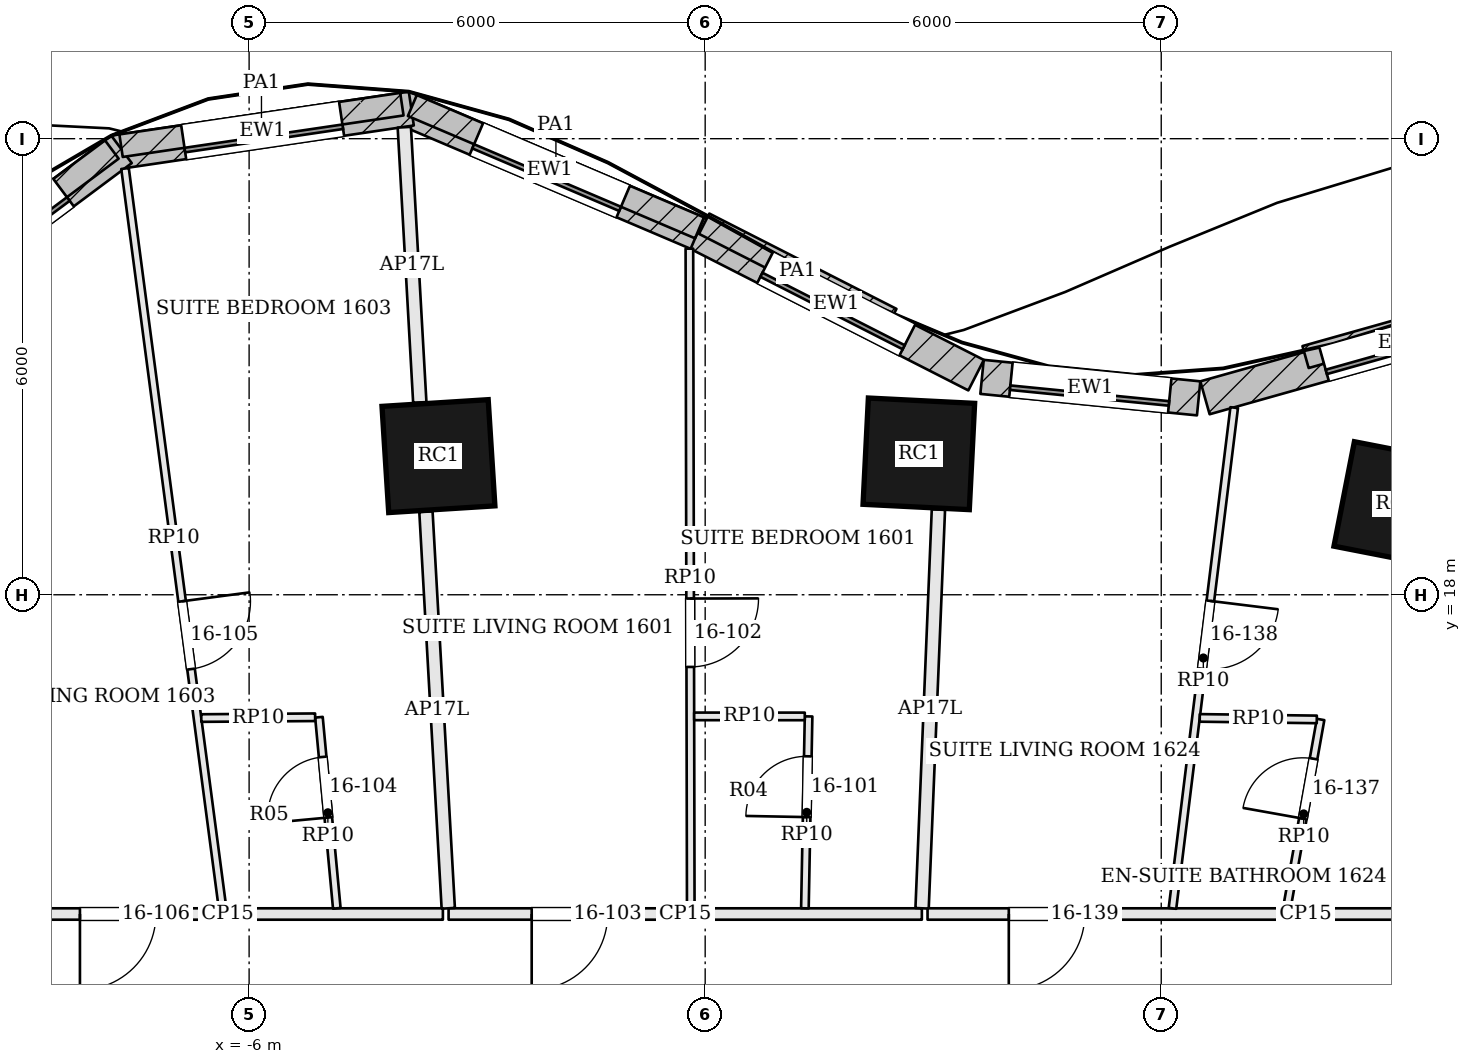
"""IFC4 building model, lengths in metres.
Left out: names, types, materials, properties, quantities, classifications, styles, units other than length and angle.
Written with IfcOpenShell. Run it as: python <this file> out.ifc"""

import sys

from ifc_helpers import new_model, si_unit, direction, frame, frame_2d, origin, origin_2d, place, context, subcontext, project, spatial, rectangle, extrude, element, fill, save


model = new_model("IFC4")
c1 = context("Model", 3, precision=1e-05, world=origin(), true_north=direction((0.0, 1.0)))
c2 = subcontext(c1, "Body", "Model", "MODEL_VIEW")
j1 = project(units=[si_unit("LENGTHUNIT", "METRE"), si_unit("PLANEANGLEUNIT", "RADIAN")], contexts=[c1])
p1 = place(None, origin())
s1 = spatial("IfcSite", under=j1, at=p1, CompositionType="ELEMENT")
p2 = place(p1, origin())
s2 = spatial("IfcBuilding", under=s1, at=p2, CompositionType="ELEMENT")
p3 = place(p2, frame((0.0, 0.0, 73.5)))
s3 = spatial("IfcBuildingStorey", under=s2, at=p3, CompositionType="ELEMENT", Elevation=73.5)
for number, where, z_axis, x_axis in (
    (1, (9.094, 19.192, 0.0), (0.0, 0.0, 1.0), (-0.981, 0.192, 0.0)),
    (2, (2.811, 19.854, 0.0), (0.0, 0.0, 1.0), (-0.999, 0.05, 0.0)),
    (3, (-3.509, 19.824, 0.0), (0.0, 0.0, 1.0), (-0.998, -0.063, 0.0)),
):
    element("IfcColumn", number, at=place(p3, frame(where, z_axis=z_axis, x_axis=x_axis)), inside=s3, PredefinedType="COLUMN", context=c2, shape_type="SweptSolid", body=[
        extrude(rectangle(XDim=1.4, YDim=1.4, at=origin_2d()), origin(), (0.0, 0.0, 1.0), 2.8),
    ])
p4 = place(p3, frame((11.732, 22.044, 0.0), z_axis=(0.0, 0.0, 1.0), x_axis=(-0.962535416232, -0.271155992925, 0.0)))
e4 = element("IfcWall", 4, at=p4, inside=s3, PredefinedType="SOLIDWALL", context=c2, shape_type="SweptSolid", body=[
    extrude(rectangle(XDim=5.357, YDim=0.45, at=frame_2d((2.679, 0.0))), origin(), (0.0, 0.0, 1.0), 3.3),
])
p5 = place(p4, frame((1.629, 0.0, 0.9)))
e5 = element("IfcOpeningElement", 5, at=p5, cuts=e4, PredefinedType="OPENING", context=c2, shape_type="SweptSolid", body=[
    extrude(rectangle(XDim=2.1, YDim=1.8, at=frame_2d((1.05, 0.9))), frame((0.0, 0.235, 0.0), z_axis=(0.0, -1.0, 0.0), x_axis=(1.0, 0.0, 0.0)), (0.0, 0.0, 1.0), 0.47),
])
p6 = place(p3, frame((6.492, 20.584, 0.0), z_axis=(0.0, 0.0, 1.0), x_axis=(-0.995123748575, 0.098634299418, 0.0)))
e6 = element("IfcWall", 6, at=p6, inside=s3, PredefinedType="SOLIDWALL", context=c2, shape_type="SweptSolid", body=[
    extrude(rectangle(XDim=2.864, YDim=0.45, at=frame_2d((1.432, 0.0))), origin(), (0.0, 0.0, 1.0), 3.3),
])
p7 = place(p6, frame((0.382, 0.0, 0.9)))
e7 = element("IfcOpeningElement", 7, at=p7, cuts=e6, PredefinedType="OPENING", context=c2, shape_type="SweptSolid", body=[
    extrude(rectangle(XDim=2.1, YDim=1.8, at=frame_2d((1.05, 0.9))), frame((0.0, 0.235, 0.0), z_axis=(0.0, -1.0, 0.0), x_axis=(1.0, 0.0, 0.0)), (0.0, 0.0, 1.0), 0.47),
])
p8 = place(p3, frame((3.564, 20.889, 0.0), z_axis=(0.0, 0.0, 1.0), x_axis=(-0.891033634447, 0.453937288933, 0.0)))
e8 = element("IfcWall", 8, at=p8, inside=s3, PredefinedType="SOLIDWALL", context=c2, shape_type="SweptSolid", body=[
    extrude(rectangle(XDim=4.132, YDim=0.45, at=frame_2d((2.066, 0.0))), origin(), (0.0, 0.0, 1.0), 3.3),
])
p9 = place(p8, frame((1.016, 0.0, 0.9)))
e9 = element("IfcOpeningElement", 9, at=p9, cuts=e8, PredefinedType="OPENING", context=c2, shape_type="SweptSolid", body=[
    extrude(rectangle(XDim=2.1, YDim=1.8, at=frame_2d((1.05, 0.9))), frame((0.0, 0.235, 0.0), z_axis=(0.0, -1.0, 0.0), x_axis=(1.0, 0.0, 0.0)), (0.0, 0.0, 1.0), 0.47),
])
p10 = place(p3, frame((-0.103, 22.758, 0.0), z_axis=(0.0, 0.0, 1.0), x_axis=(-0.920037498786, 0.391830321475, 0.0)))
e10 = element("IfcWall", 10, at=p10, inside=s3, PredefinedType="SOLIDWALL", context=c2, shape_type="SweptSolid", body=[
    extrude(rectangle(XDim=4.219, YDim=0.45, at=frame_2d((2.11, 0.0))), origin(), (0.0, 0.0, 1.0), 3.3),
])
p11 = place(p10, frame((1.06, 0.0, 0.9)))
e11 = element("IfcOpeningElement", 11, at=p11, cuts=e10, PredefinedType="OPENING", context=c2, shape_type="SweptSolid", body=[
    extrude(rectangle(XDim=2.1, YDim=1.8, at=frame_2d((1.05, 0.9))), frame((0.0, 0.235, 0.0), z_axis=(0.0, -1.0, 0.0), x_axis=(1.0, 0.0, 0.0)), (0.0, 0.0, 1.0), 0.47),
])
p12 = place(p3, frame((-3.866, 24.396, 0.0), z_axis=(0.0, 0.0, 1.0), x_axis=(-0.989255112942, -0.146199594798, 0.0)))
e12 = element("IfcWall", 12, at=p12, inside=s3, PredefinedType="SOLIDWALL", context=c2, shape_type="SweptSolid", body=[
    extrude(rectangle(XDim=3.954, YDim=0.45, at=frame_2d((1.977, 0.0))), origin(), (0.0, 0.0, 1.0), 3.3),
])
p13 = place(p12, frame((0.927, 0.0, 0.9)))
e13 = element("IfcOpeningElement", 13, at=p13, cuts=e12, PredefinedType="OPENING", context=c2, shape_type="SweptSolid", body=[
    extrude(rectangle(XDim=2.1, YDim=1.8, at=frame_2d((1.05, 0.9))), frame((0.0, 0.235, 0.0), z_axis=(0.0, -1.0, 0.0), x_axis=(1.0, 0.0, 0.0)), (0.0, 0.0, 1.0), 0.47),
])
p14 = place(p3, frame((-7.678, 23.859, 0.0), z_axis=(0.0, 0.0, 1.0), x_axis=(-0.801665619573, -0.597772728046, 0.0)))
e14 = element("IfcWall", 14, at=p14, inside=s3, PredefinedType="SOLIDWALL", context=c2, shape_type="SweptSolid", body=[
    extrude(rectangle(XDim=4.003, YDim=0.45, at=frame_2d((2.001, 0.0))), origin(), (0.0, 0.0, 1.0), 3.3),
])
p15 = place(p14, frame((0.951, 0.0, 0.9)))
e15 = element("IfcOpeningElement", 15, at=p15, cuts=e14, PredefinedType="OPENING", context=c2, shape_type="SweptSolid", body=[
    extrude(rectangle(XDim=2.1, YDim=1.8, at=frame_2d((1.05, 0.9))), frame((0.0, 0.235, 0.0), z_axis=(0.0, -1.0, 0.0), x_axis=(1.0, 0.0, 0.0)), (0.0, 0.0, 1.0), 0.47),
])
p16 = place(p3, frame((11.314, 22.089, 3.6), z_axis=(0.0, 0.0, 1.0), x_axis=(-0.962527541074, -0.271183946195, 0.0)))
e16 = element("IfcWall", 16, at=p16, inside=s3, PredefinedType="PARAPET", context=c2, shape_type="SweptSolid", body=[
    extrude(rectangle(XDim=3.548, YDim=0.3, at=frame_2d((1.774, 0.0))), origin(), (0.0, 0.0, 1.0), 1.1),
])
p17 = place(p3, frame((2.448, 21.627, 3.6), z_axis=(0.0, 0.0, 1.0), x_axis=(-0.891061751317, 0.453882094095, 0.0)))
e17 = element("IfcWall", 17, at=p17, inside=s3, PredefinedType="PARAPET", context=c2, shape_type="SweptSolid", body=[
    extrude(rectangle(XDim=2.763, YDim=0.3, at=frame_2d((1.381, 0.0))), origin(), (0.0, 0.0, 1.0), 1.1),
])
p18 = place(p3, frame((-0.075, 22.827, 3.6), z_axis=(0.0, 0.0, 1.0), x_axis=(-0.920031521407, 0.391844356367, 0.0)))
e18 = element("IfcWall", 18, at=p18, inside=s3, PredefinedType="PARAPET", context=c2, shape_type="SweptSolid", body=[
    extrude(rectangle(XDim=4.106, YDim=0.3, at=frame_2d((2.053, 0.0))), origin(), (0.0, 0.0, 1.0), 1.1),
])
p19 = place(p3, frame((-3.99, 24.454, 3.6), z_axis=(0.0, 0.0, 1.0), x_axis=(-0.989258150551, -0.146179039429, 0.0)))
e19 = element("IfcWall", 19, at=p19, inside=s3, PredefinedType="PARAPET", context=c2, shape_type="SweptSolid", body=[
    extrude(rectangle(XDim=3.734, YDim=0.3, at=frame_2d((1.867, 0.0))), origin(), (0.0, 0.0, 1.0), 1.1),
])
p20 = place(p3, frame((-7.806, 23.858, 3.6), z_axis=(0.0, 0.0, 1.0), x_axis=(-0.801649538596, -0.597794293439, 0.0)))
e20 = element("IfcWall", 20, at=p20, inside=s3, PredefinedType="PARAPET", context=c2, shape_type="SweptSolid", body=[
    extrude(rectangle(XDim=3.865, YDim=0.3, at=frame_2d((1.932, 0.0))), origin(), (0.0, 0.0, 1.0), 1.1),
])
p21 = place(p3, frame((2.851, 13.8, 0.0), z_axis=(0.0, 0.0, 1.0), x_axis=(-1.0, 0.0, 0.0)))
e21 = element("IfcWall", 21, at=p21, inside=s3, PredefinedType="PARTITIONING", context=c2, shape_type="SweptSolid", body=[
    extrude(rectangle(XDim=6.226, YDim=0.15, at=frame_2d((3.113, 0.0))), origin(), (0.0, 0.0, 1.0), 2.684),
])
p22 = place(p21, frame((4.133, 0.0, 0.0)))
e22 = element("IfcOpeningElement", 22, at=p22, cuts=e21, PredefinedType="OPENING", context=c2, shape_type="SweptSolid", body=[
    extrude(rectangle(XDim=1.0, YDim=2.1, at=frame_2d((0.5, 1.05))), frame((0.0, 0.085, 0.0), z_axis=(0.0, -1.0, 0.0), x_axis=(1.0, 0.0, 0.0)), (0.0, 0.0, 1.0), 0.17),
])
p23 = place(p3, frame((3.069, 19.12, 0.0), z_axis=(0.0, 0.0, 1.0), x_axis=(-0.040926396591, -0.999162164046, 0.0)))
e23 = element("IfcWall", 23, at=p23, inside=s3, PredefinedType="PARTITIONING", context=c2, shape_type="SweptSolid", body=[
    extrude(rectangle(XDim=5.25, YDim=0.175, at=frame_2d((2.625, 0.0))), origin(), (0.0, 0.0, 1.0), 2.28),
])
p24 = place(p3, frame((-3.958, 24.151, 0.0), z_axis=(0.0, 0.0, 1.0), x_axis=(0.056208193319, -0.998419069832, 0.0)))
e24 = element("IfcWall", 24, at=p24, inside=s3, PredefinedType="PARTITIONING", context=c2, shape_type="SweptSolid", body=[
    extrude(rectangle(XDim=3.627, YDim=0.175, at=frame_2d((1.813, 0.0))), origin(), (0.0, 0.0, 1.0), 2.28),
])
p25 = place(p3, frame((-3.674, 19.092, 0.0), z_axis=(0.0, 0.0, 1.0), x_axis=(0.056204883722, -0.998419256147, 0.0)))
e25 = element("IfcWall", 25, at=p25, inside=s3, PredefinedType="PARTITIONING", context=c2, shape_type="SweptSolid", body=[
    extrude(rectangle(XDim=5.226, YDim=0.175, at=frame_2d((2.613, 0.0))), origin(), (0.0, 0.0, 1.0), 2.28),
])
p26 = place(p3, frame((-3.451, 13.8, 0.0), z_axis=(0.0, 0.0, 1.0), x_axis=(-1.0, 0.0, 0.0)))
e26 = element("IfcWall", 26, at=p26, inside=s3, PredefinedType="PARTITIONING", context=c2, shape_type="SweptSolid", body=[
    extrude(rectangle(XDim=5.661, YDim=0.15, at=frame_2d((2.831, 0.0))), origin(), (0.0, 0.0, 1.0), 2.684),
])
p27 = place(p26, frame((3.775, 0.0, 0.0)))
e27 = element("IfcOpeningElement", 27, at=p27, cuts=e26, PredefinedType="OPENING", context=c2, shape_type="SweptSolid", body=[
    extrude(rectangle(XDim=1.0, YDim=2.1, at=frame_2d((0.5, 1.05))), frame((0.0, 0.085, 0.0), z_axis=(0.0, -1.0, 0.0), x_axis=(1.0, 0.0, 0.0)), (0.0, 0.0, 1.0), 0.17),
])
p28 = place(p3, frame((12.872, 13.8, 0.0), z_axis=(0.0, 0.0, 1.0), x_axis=(-1.0, 0.0, 0.0)))
e28 = element("IfcWall", 28, at=p28, inside=s3, PredefinedType="PARTITIONING", context=c2, shape_type="SweptSolid", body=[
    extrude(rectangle(XDim=9.946, YDim=0.15, at=frame_2d((4.973, 0.0))), origin(), (0.0, 0.0, 1.0), 2.684),
])
p29 = place(p28, frame((7.877, 0.0, 0.0)))
e29 = element("IfcOpeningElement", 29, at=p29, cuts=e28, PredefinedType="OPENING", context=c2, shape_type="SweptSolid", body=[
    extrude(rectangle(XDim=1.0, YDim=2.1, at=frame_2d((0.5, 1.05))), frame((0.0, 0.085, 0.0), z_axis=(0.0, -1.0, 0.0), x_axis=(1.0, 0.0, 0.0)), (0.0, 0.0, 1.0), 0.17),
])
p30 = place(p3, frame((-0.208, 22.553, 0.0), z_axis=(0.0, 0.0, 1.0), x_axis=(0.002053672595, -0.999997891212, 0.0)))
e30 = element("IfcWall", 30, at=p30, inside=s3, PredefinedType="PARTITIONING", context=c2, shape_type="SweptSolid", body=[
    extrude(rectangle(XDim=8.678, YDim=0.1, at=frame_2d((4.339, 0.0))), origin(), (0.0, 0.0, 1.0), 2.784),
])
p31 = place(p30, frame((4.603, 0.0, 0.0)))
e31 = element("IfcOpeningElement", 31, at=p31, cuts=e30, PredefinedType="OPENING", context=c2, shape_type="SweptSolid", body=[
    extrude(rectangle(XDim=0.9, YDim=2.4, at=frame_2d((0.45, 1.2))), frame((0.0, 0.06, 0.0), z_axis=(0.0, -1.0, 0.0), x_axis=(1.0, 0.0, 0.0)), (0.0, 0.0, 1.0), 0.12),
])
p32 = place(p3, frame((1.312, 13.875, 0.0), z_axis=(0.0, 0.0, 1.0), x_axis=(0.019145426353, 0.999816709527, 0.0)))
e32 = element("IfcWall", 32, at=p32, inside=s3, PredefinedType="PARTITIONING", context=c2, shape_type="SweptSolid", body=[
    extrude(rectangle(XDim=2.525, YDim=0.1, at=frame_2d((1.262, 0.0))), origin(), (0.0, 0.0, 1.0), 2.784),
])
p33 = place(p32, frame((1.2, 0.0, 0.0)))
e33 = element("IfcOpeningElement", 33, at=p33, cuts=e32, PredefinedType="OPENING", context=c2, shape_type="SweptSolid", body=[
    extrude(rectangle(XDim=0.8, YDim=2.1, at=frame_2d((0.4, 1.05))), frame((0.0, 0.06, 0.0), z_axis=(0.0, -1.0, 0.0), x_axis=(1.0, 0.0, 0.0)), (0.0, 0.0, 1.0), 0.12),
])
p34 = place(p3, frame((1.31, 16.399, 0.0), z_axis=(0.0, 0.0, 1.0), x_axis=(-0.999999943696, 0.000335570451, 0.0)))
e34 = element("IfcWall", 34, at=p34, inside=s3, PredefinedType="PARTITIONING", context=c2, shape_type="SweptSolid", body=[
    extrude(rectangle(XDim=1.455, YDim=0.1, at=frame_2d((0.728, 0.0))), origin(), (0.0, 0.0, 1.0), 2.784),
])
p35 = place(p3, frame((-7.633, 23.608, 0.0), z_axis=(0.0, 0.0, 1.0), x_axis=(0.130728541202, -0.991418200617, 0.0)))
e35 = element("IfcWall", 35, at=p35, inside=s3, PredefinedType="PARTITIONING", context=c2, shape_type="SweptSolid", body=[
    extrude(rectangle(XDim=9.818, YDim=0.1, at=frame_2d((4.909, 0.0))), origin(), (0.0, 0.0, 1.0), 2.784),
])
p36 = place(p35, frame((5.743, 0.0, 0.0)))
e36 = element("IfcOpeningElement", 36, at=p36, cuts=e35, PredefinedType="OPENING", context=c2, shape_type="SweptSolid", body=[
    extrude(rectangle(XDim=0.9, YDim=2.4, at=frame_2d((0.45, 1.2))), frame((0.0, 0.06, 0.0), z_axis=(0.0, -1.0, 0.0), x_axis=(1.0, 0.0, 0.0)), (0.0, 0.0, 1.0), 0.12),
])
p37 = place(p3, frame((-4.846, 13.875, 0.0), z_axis=(0.0, 0.0, 1.0), x_axis=(-0.093020198256, 0.995664221872, 0.0)))
e37 = element("IfcWall", 37, at=p37, inside=s3, PredefinedType="PARTITIONING", context=c2, shape_type="SweptSolid", body=[
    extrude(rectangle(XDim=2.525, YDim=0.1, at=frame_2d((1.262, 0.0))), origin(), (0.0, 0.0, 1.0), 2.784),
])
p38 = place(p37, frame((1.2, 0.0, 0.0)))
e38 = element("IfcOpeningElement", 38, at=p38, cuts=e37, PredefinedType="OPENING", context=c2, shape_type="SweptSolid", body=[
    extrude(rectangle(XDim=0.8, YDim=2.1, at=frame_2d((0.4, 1.05))), frame((0.0, 0.06, 0.0), z_axis=(0.0, -1.0, 0.0), x_axis=(1.0, 0.0, 0.0)), (0.0, 0.0, 1.0), 0.12),
])
p39 = place(p3, frame((-5.131, 16.388, 0.0), z_axis=(0.0, 0.0, 1.0), x_axis=(-0.99997543811, -0.007008792802, 0.0)))
e39 = element("IfcWall", 39, at=p39, inside=s3, PredefinedType="PARTITIONING", context=c2, shape_type="SweptSolid", body=[
    extrude(rectangle(XDim=1.498, YDim=0.1, at=frame_2d((0.749, 0.0))), origin(), (0.0, 0.0, 1.0), 2.784),
])
p40 = place(p3, frame((6.96, 20.462, 0.0), z_axis=(0.0, 0.0, 1.0), x_axis=(-0.12234585507, -0.99248752725, 0.0)))
e40 = element("IfcWall", 40, at=p40, inside=s3, PredefinedType="PARTITIONING", context=c2, shape_type="SweptSolid", body=[
    extrude(rectangle(XDim=6.637, YDim=0.1, at=frame_2d((3.318, 0.0))), origin(), (0.0, 0.0, 1.0), 2.784),
])
p41 = place(p40, frame((2.562, 0.0, 0.0)))
e41 = element("IfcOpeningElement", 41, at=p41, cuts=e40, PredefinedType="OPENING", context=c2, shape_type="SweptSolid", body=[
    extrude(rectangle(XDim=0.9, YDim=2.4, at=frame_2d((0.45, 1.2))), frame((0.0, 0.06, 0.0), z_axis=(0.0, -1.0, 0.0), x_axis=(1.0, 0.0, 0.0)), (0.0, 0.0, 1.0), 0.12),
])
p42 = place(p3, frame((7.652, 13.874, 0.0), z_axis=(0.0, 0.0, 1.0), x_axis=(0.176068384664, 0.984377937543, 0.0)))
e42 = element("IfcWall", 42, at=p42, inside=s3, PredefinedType="PARTITIONING", context=c2, shape_type="SweptSolid", body=[
    extrude(rectangle(XDim=2.525, YDim=0.1, at=frame_2d((1.263, 0.0))), origin(), (0.0, 0.0, 1.0), 2.784),
])
p43 = place(p42, frame((1.2, 0.0, 0.0)))
e43 = element("IfcOpeningElement", 43, at=p43, cuts=e42, PredefinedType="OPENING", context=c2, shape_type="SweptSolid", body=[
    extrude(rectangle(XDim=0.8, YDim=2.1, at=frame_2d((0.4, 1.05))), frame((0.0, 0.06, 0.0), z_axis=(0.0, -1.0, 0.0), x_axis=(1.0, 0.0, 0.0)), (0.0, 0.0, 1.0), 0.12),
])
p44 = place(p3, frame((8.046, 16.36, 0.0), z_axis=(0.0, 0.0, 1.0), x_axis=(-0.999917540507, 0.012841813981, 0.0)))
e44 = element("IfcWall", 44, at=p44, inside=s3, PredefinedType="PARTITIONING", context=c2, shape_type="SweptSolid", body=[
    extrude(rectangle(XDim=1.54, YDim=0.1, at=frame_2d((0.77, 0.0))), origin(), (0.0, 0.0, 1.0), 2.784),
])
p45 = place(p5, origin())
e45 = element("IfcWindow", 45, at=p45, inside=s3, PartitioningType="SINGLE_PANEL", PredefinedType="WINDOW", context=c2, shape_type="SweptSolid", body=[
    extrude(rectangle(XDim=2.1, YDim=1.8, at=frame_2d((1.05, 0.9))), frame((0.0, 0.135, 0.0), z_axis=(0.0, -1.0, 0.0), x_axis=(1.0, 0.0, 0.0)), (0.0, 0.0, 1.0), 0.06),
])
fill(e5, e45)
p46 = place(p7, origin())
e46 = element("IfcWindow", 46, at=p46, inside=s3, PartitioningType="SINGLE_PANEL", PredefinedType="WINDOW", context=c2, shape_type="SweptSolid", body=[
    extrude(rectangle(XDim=2.1, YDim=1.8, at=frame_2d((1.05, 0.9))), frame((0.0, 0.135, 0.0), z_axis=(0.0, -1.0, 0.0), x_axis=(1.0, 0.0, 0.0)), (0.0, 0.0, 1.0), 0.06),
])
fill(e7, e46)
p47 = place(p9, origin())
e47 = element("IfcWindow", 47, at=p47, inside=s3, PartitioningType="SINGLE_PANEL", PredefinedType="WINDOW", context=c2, shape_type="SweptSolid", body=[
    extrude(rectangle(XDim=2.1, YDim=1.8, at=frame_2d((1.05, 0.9))), frame((0.0, 0.135, 0.0), z_axis=(0.0, -1.0, 0.0), x_axis=(1.0, 0.0, 0.0)), (0.0, 0.0, 1.0), 0.06),
])
fill(e9, e47)
p48 = place(p11, origin())
e48 = element("IfcWindow", 48, at=p48, inside=s3, PartitioningType="SINGLE_PANEL", PredefinedType="WINDOW", context=c2, shape_type="SweptSolid", body=[
    extrude(rectangle(XDim=2.1, YDim=1.8, at=frame_2d((1.05, 0.9))), frame((0.0, 0.135, 0.0), z_axis=(0.0, -1.0, 0.0), x_axis=(1.0, 0.0, 0.0)), (0.0, 0.0, 1.0), 0.06),
])
fill(e11, e48)
p49 = place(p13, origin())
e49 = element("IfcWindow", 49, at=p49, inside=s3, PartitioningType="SINGLE_PANEL", PredefinedType="WINDOW", context=c2, shape_type="SweptSolid", body=[
    extrude(rectangle(XDim=2.1, YDim=1.8, at=frame_2d((1.05, 0.9))), frame((0.0, 0.135, 0.0), z_axis=(0.0, -1.0, 0.0), x_axis=(1.0, 0.0, 0.0)), (0.0, 0.0, 1.0), 0.06),
])
fill(e13, e49)
p50 = place(p15, origin())
e50 = element("IfcWindow", 50, at=p50, inside=s3, PartitioningType="SINGLE_PANEL", PredefinedType="WINDOW", context=c2, shape_type="SweptSolid", body=[
    extrude(rectangle(XDim=2.1, YDim=1.8, at=frame_2d((1.05, 0.9))), frame((0.0, 0.135, 0.0), z_axis=(0.0, -1.0, 0.0), x_axis=(1.0, 0.0, 0.0)), (0.0, 0.0, 1.0), 0.06),
])
fill(e15, e50)
p51 = place(p33, origin())
e51 = element("IfcDoor", 51, at=p51, inside=s3, OperationType="SINGLE_SWING_LEFT", PredefinedType="DOOR", context=c2, shape_type="SweptSolid", body=[
    extrude(rectangle(XDim=0.8, YDim=2.1, at=frame_2d((0.4, 1.05))), frame((0.0, 0.025, 0.0), z_axis=(0.0, -1.0, 0.0), x_axis=(1.0, 0.0, 0.0)), (0.0, 0.0, 1.0), 0.05),
])
fill(e33, e51)
p52 = place(p31, origin())
e52 = element("IfcDoor", 52, at=p52, inside=s3, OperationType="SINGLE_SWING_LEFT", PredefinedType="DOOR", context=c2, shape_type="SweptSolid", body=[
    extrude(rectangle(XDim=0.9, YDim=2.4, at=frame_2d((0.45, 1.2))), frame((0.0, 0.025, 0.0), z_axis=(0.0, -1.0, 0.0), x_axis=(1.0, 0.0, 0.0)), (0.0, 0.0, 1.0), 0.05),
])
fill(e31, e52)
p53 = place(p22, origin())
e53 = element("IfcDoor", 53, at=p53, inside=s3, OperationType="SINGLE_SWING_RIGHT", PredefinedType="DOOR", context=c2, shape_type="SweptSolid", body=[
    extrude(rectangle(XDim=1.0, YDim=2.1, at=frame_2d((0.5, 1.05))), frame((0.0, 0.025, 0.0), z_axis=(0.0, -1.0, 0.0), x_axis=(1.0, 0.0, 0.0)), (0.0, 0.0, 1.0), 0.05),
])
fill(e22, e53)
p54 = place(p38, origin())
e54 = element("IfcDoor", 54, at=p54, inside=s3, OperationType="SINGLE_SWING_LEFT", PredefinedType="DOOR", context=c2, shape_type="SweptSolid", body=[
    extrude(rectangle(XDim=0.8, YDim=2.1, at=frame_2d((0.4, 1.05))), frame((0.0, 0.025, 0.0), z_axis=(0.0, -1.0, 0.0), x_axis=(1.0, 0.0, 0.0)), (0.0, 0.0, 1.0), 0.05),
])
fill(e38, e54)
p55 = place(p36, origin())
e55 = element("IfcDoor", 55, at=p55, inside=s3, OperationType="SINGLE_SWING_LEFT", PredefinedType="DOOR", context=c2, shape_type="SweptSolid", body=[
    extrude(rectangle(XDim=0.9, YDim=2.4, at=frame_2d((0.45, 1.2))), frame((0.0, 0.025, 0.0), z_axis=(0.0, -1.0, 0.0), x_axis=(1.0, 0.0, 0.0)), (0.0, 0.0, 1.0), 0.05),
])
fill(e36, e55)
p56 = place(p27, origin())
e56 = element("IfcDoor", 56, at=p56, inside=s3, OperationType="SINGLE_SWING_RIGHT", PredefinedType="DOOR", context=c2, shape_type="SweptSolid", body=[
    extrude(rectangle(XDim=1.0, YDim=2.1, at=frame_2d((0.5, 1.05))), frame((0.0, 0.025, 0.0), z_axis=(0.0, -1.0, 0.0), x_axis=(1.0, 0.0, 0.0)), (0.0, 0.0, 1.0), 0.05),
])
fill(e27, e56)
p57 = place(p43, origin())
e57 = element("IfcDoor", 57, at=p57, inside=s3, OperationType="SINGLE_SWING_LEFT", PredefinedType="DOOR", context=c2, shape_type="SweptSolid", body=[
    extrude(rectangle(XDim=0.8, YDim=2.1, at=frame_2d((0.4, 1.05))), frame((0.0, 0.025, 0.0), z_axis=(0.0, -1.0, 0.0), x_axis=(1.0, 0.0, 0.0)), (0.0, 0.0, 1.0), 0.05),
])
fill(e43, e57)
p58 = place(p41, origin())
e58 = element("IfcDoor", 58, at=p58, inside=s3, OperationType="SINGLE_SWING_LEFT", PredefinedType="DOOR", context=c2, shape_type="SweptSolid", body=[
    extrude(rectangle(XDim=0.9, YDim=2.4, at=frame_2d((0.45, 1.2))), frame((0.0, 0.025, 0.0), z_axis=(0.0, -1.0, 0.0), x_axis=(1.0, 0.0, 0.0)), (0.0, 0.0, 1.0), 0.05),
])
fill(e41, e58)
p59 = place(p29, origin())
e59 = element("IfcDoor", 59, at=p59, inside=s3, OperationType="SINGLE_SWING_RIGHT", PredefinedType="DOOR", context=c2, shape_type="SweptSolid", body=[
    extrude(rectangle(XDim=1.0, YDim=2.1, at=frame_2d((0.5, 1.05))), frame((0.0, 0.025, 0.0), z_axis=(0.0, -1.0, 0.0), x_axis=(1.0, 0.0, 0.0)), (0.0, 0.0, 1.0), 0.05),
])
fill(e29, e59)
save(model, sys.argv[1])
